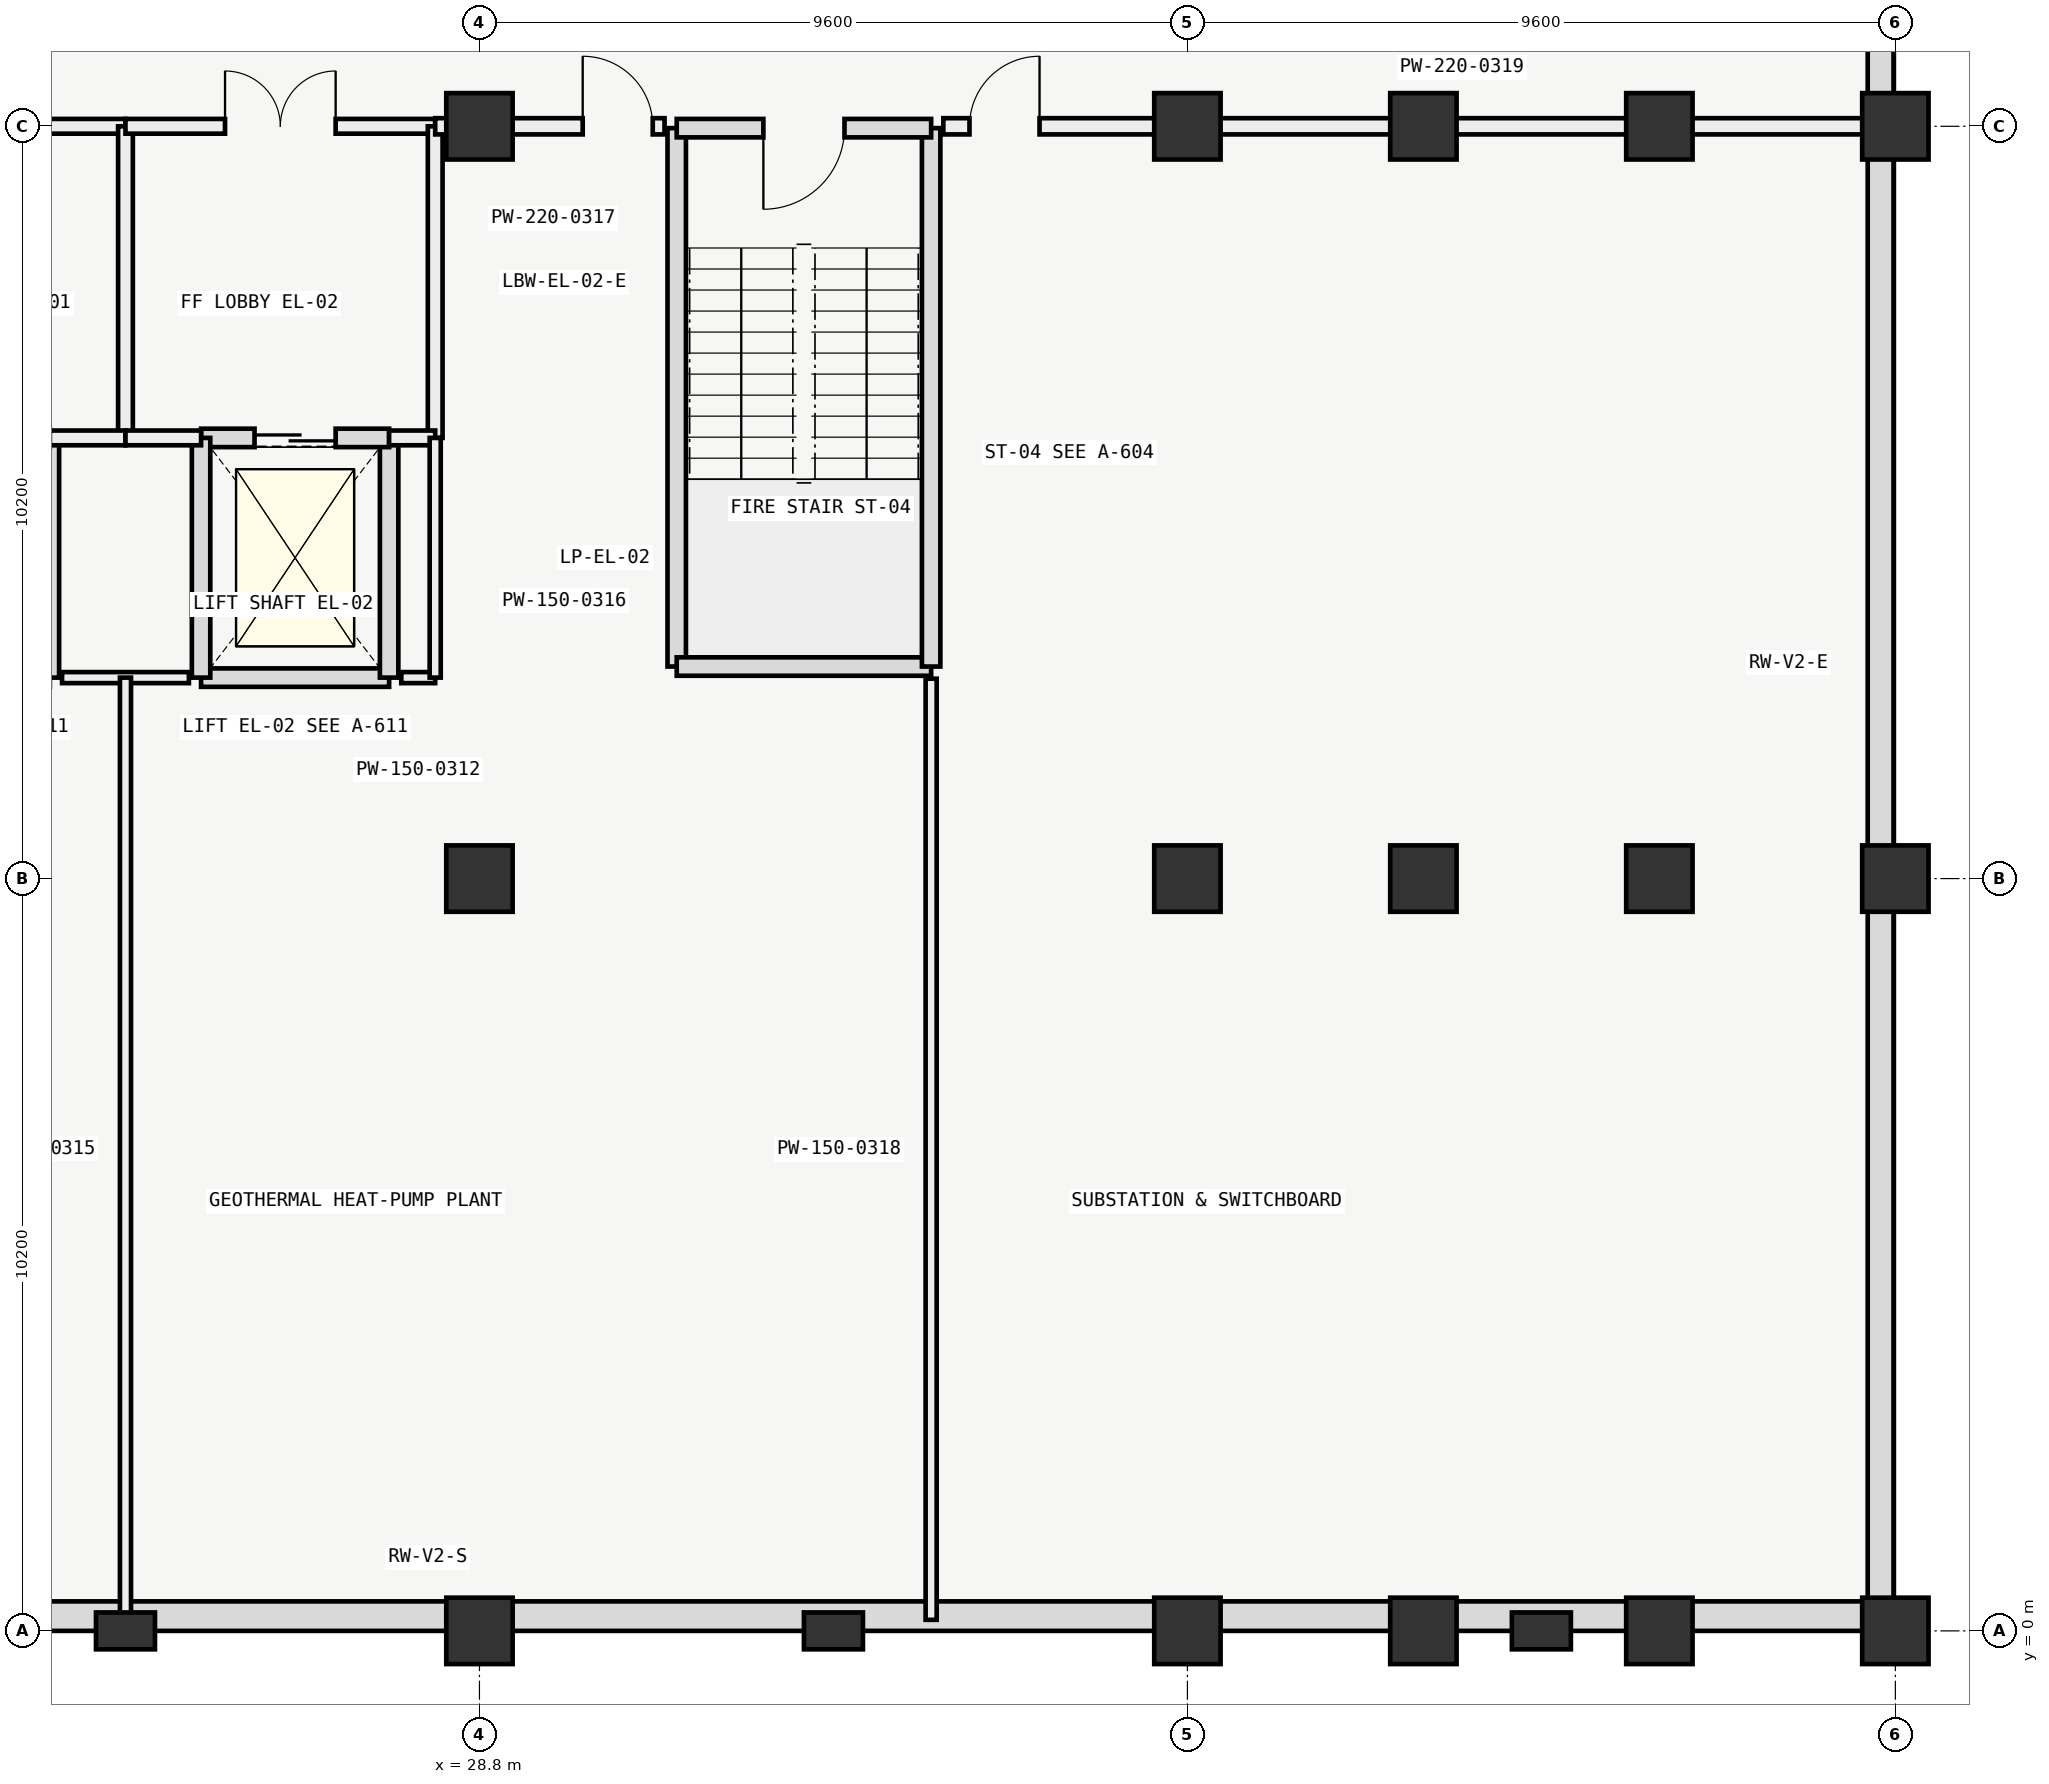
"""IFC4 building model, lengths in metres.
Left out: names, types, materials, properties, quantities, classifications, styles, units other than length and angle.
Written with IfcOpenShell. Run it as: python <this file> out.ifc"""

import sys

from ifc_helpers import new_model, si_unit, direction, frame, frame_2d, origin, origin_2d, place, context, subcontext, project, spatial, rectangle, extrude, element, fill, save


model = new_model("IFC4")
c1 = context("Model", 3, precision=1e-05, world=origin(), true_north=direction((0.0, 1.0)))
c2 = subcontext(c1, "Body", "Model", "MODEL_VIEW")
j1 = project(units=[si_unit("LENGTHUNIT", "METRE"), si_unit("PLANEANGLEUNIT", "RADIAN")], contexts=[c1])
p1 = place(None, origin())
s1 = spatial("IfcSite", under=j1, at=p1, CompositionType="ELEMENT")
p2 = place(p1, origin())
s2 = spatial("IfcBuilding", under=s1, at=p2, CompositionType="ELEMENT")
p3 = place(p2, frame((0.0, 0.0, -4.2)))
s3 = spatial("IfcBuildingStorey", under=s2, at=p3, CompositionType="ELEMENT", Elevation=-4.2)
for number, where, z_axis, x_axis in (
    (1, (28.8, 0.0, 0.0), (0.0, 0.0, 1.0), (1.0, 0.0, 0.0)),
    (2, (28.8, 10.2, 0.0), (0.0, 0.0, 1.0), (1.0, 0.0, 0.0)),
    (3, (28.8, 20.4, 0.0), (0.0, 0.0, 1.0), (1.0, 0.0, 0.0)),
    (4, (38.4, 0.0, 0.0), (0.0, 0.0, 1.0), (1.0, 0.0, 0.0)),
    (5, (38.4, 10.2, 0.0), (0.0, 0.0, 1.0), (1.0, 0.0, 0.0)),
    (6, (38.4, 20.4, 0.0), (0.0, 0.0, 1.0), (1.0, 0.0, 0.0)),
    (7, (41.6, 0.0, 0.0), (0.0, 0.0, 1.0), (1.0, 0.0, 0.0)),
    (8, (41.6, 10.2, 0.0), (0.0, 0.0, 1.0), (1.0, 0.0, 0.0)),
    (9, (41.6, 20.4, 0.0), (0.0, 0.0, 1.0), (1.0, 0.0, 0.0)),
    (10, (44.8, 0.0, 0.0), (0.0, 0.0, 1.0), (1.0, 0.0, 0.0)),
    (11, (44.8, 10.2, 0.0), (0.0, 0.0, 1.0), (1.0, 0.0, 0.0)),
    (12, (44.8, 20.4, 0.0), (0.0, 0.0, 1.0), (1.0, 0.0, 0.0)),
    (13, (48.0, 0.0, 0.0), (0.0, 0.0, 1.0), (1.0, 0.0, 0.0)),
    (14, (48.0, 10.2, 0.0), (0.0, 0.0, 1.0), (1.0, 0.0, 0.0)),
    (15, (48.0, 20.4, 0.0), (0.0, 0.0, 1.0), (1.0, 0.0, 0.0)),
):
    element("IfcColumn", number, at=place(p3, frame(where, z_axis=z_axis, x_axis=x_axis)), inside=s3, PredefinedType="COLUMN", context=c2, shape_type="SweptSolid", body=[
        extrude(rectangle(XDim=0.9, YDim=0.9, at=origin_2d()), origin(), (0.0, 0.0, 1.0), 4.2),
    ])
for number, where, z_axis, x_axis in (
    (16, (24.0, 0.0, 0.0), (0.0, 0.0, 1.0), (0.0, 1.0, 0.0)),
    (17, (33.6, 0.0, 0.0), (0.0, 0.0, 1.0), (0.0, 1.0, 0.0)),
    (18, (43.2, 0.0, 0.0), (0.0, 0.0, 1.0), (0.0, 1.0, 0.0)),
):
    element("IfcColumn", number, at=place(p3, frame(where, z_axis=z_axis, x_axis=x_axis)), inside=s3, PredefinedType="PILASTER", context=c2, shape_type="SweptSolid", body=[
        extrude(rectangle(XDim=0.5, YDim=0.8, at=origin_2d()), origin(), (0.0, 0.0, 1.0), 4.2),
    ])
p4 = place(p3, frame((8.4, 0.2, 0.0), z_axis=(0.0, 0.0, 1.0), x_axis=(1.0, 0.0, 0.0)))
e19 = element("IfcWall", 19, at=p4, inside=s3, PredefinedType="USERDEFINED", context=c2, shape_type="SweptSolid", body=[
    extrude(rectangle(XDim=39.4, YDim=0.4, at=frame_2d((19.7, 0.0))), origin(), (0.0, 0.0, 1.0), 3.9),
])
p5 = place(p3, frame((47.8, 0.2, 0.0), z_axis=(0.0, 0.0, 1.0), x_axis=(0.0, 1.0, 0.0)))
e20 = element("IfcWall", 20, at=p5, inside=s3, PredefinedType="USERDEFINED", context=c2, shape_type="SweptSolid", body=[
    extrude(rectangle(XDim=40.4, YDim=0.35, at=frame_2d((20.2, 0.0))), origin(), (0.0, 0.0, 1.0), 3.9),
])
p6 = place(p3, frame((31.475, 20.375, 0.0), z_axis=(0.0, 0.0, 1.0), x_axis=(0.0, -1.0, 0.0)))
e21 = element("IfcWall", 21, at=p6, inside=s3, PredefinedType="SOLIDWALL", context=c2, shape_type="SweptSolid", body=[
    extrude(rectangle(XDim=7.3, YDim=0.25, at=frame_2d((3.65, 0.0))), origin(), (0.0, 0.0, 1.0), 3.9),
])
p7 = place(p3, frame((31.475, 13.075, 0.0), z_axis=(0.0, 0.0, 1.0), x_axis=(1.0, 0.0, 0.0)))
e22 = element("IfcWall", 22, at=p7, inside=s3, PredefinedType="SOLIDWALL", context=c2, shape_type="SweptSolid", body=[
    extrude(rectangle(XDim=3.45, YDim=0.25, at=frame_2d((1.725, 0.0))), origin(), (0.0, 0.0, 1.0), 3.9),
])
p8 = place(p3, frame((34.925, 13.075, 0.0), z_axis=(0.0, 0.0, 1.0), x_axis=(0.0, 1.0, 0.0)))
e23 = element("IfcWall", 23, at=p8, inside=s3, PredefinedType="SOLIDWALL", context=c2, shape_type="SweptSolid", body=[
    extrude(rectangle(XDim=7.3, YDim=0.25, at=frame_2d((3.65, 0.0))), origin(), (0.0, 0.0, 1.0), 3.9),
])
p9 = place(p3, frame((34.925, 20.375, 0.0), z_axis=(0.0, 0.0, 1.0), x_axis=(-1.0, 0.0, 0.0)))
e24 = element("IfcWall", 24, at=p9, inside=s3, PredefinedType="SOLIDWALL", context=c2, shape_type="SweptSolid", body=[
    extrude(rectangle(XDim=3.45, YDim=0.25, at=frame_2d((1.725, 0.0))), origin(), (0.0, 0.0, 1.0), 3.9),
])
p10 = place(p9, frame((1.175, 0.0, 0.0)))
e25 = element("IfcOpeningElement", 25, at=p10, cuts=e24, PredefinedType="OPENING", context=c2, shape_type="SweptSolid", body=[
    extrude(rectangle(XDim=1.1, YDim=2.2, at=frame_2d((0.55, 1.1))), frame((0.0, 0.135, 0.0), z_axis=(0.0, -1.0, 0.0), x_axis=(1.0, 0.0, 0.0)), (0.0, 0.0, 1.0), 0.27),
])
p11 = place(p3, frame((22.975, 12.925, -0.15), z_axis=(0.0, 0.0, 1.0), x_axis=(0.0, 1.0, 0.0)))
e26 = element("IfcWall", 26, at=p11, inside=s3, PredefinedType="SOLIDWALL", context=c2, shape_type="SweptSolid", body=[
    extrude(rectangle(XDim=3.25, YDim=0.25, at=frame_2d((1.625, 0.0))), origin(), (0.0, 0.0, 1.0), 4.05),
])
p12 = place(p3, frame((19.8, 20.4, 0.0), z_axis=(0.0, 0.0, 1.0), x_axis=(1.0, 0.0, 0.0)))
e27 = element("IfcWall", 27, at=p12, inside=s3, PredefinedType="PARTITIONING", context=c2, shape_type="SweptSolid", body=[
    extrude(rectangle(XDim=4.2, YDim=0.2, at=frame_2d((2.1, 0.0))), origin(), (0.0, 0.0, 1.0), 3.18),
])
p13 = place(p12, frame((1.35, 0.0, 0.0)))
e28 = element("IfcOpeningElement", 28, at=p13, cuts=e27, PredefinedType="OPENING", context=c2, shape_type="SweptSolid", body=[
    extrude(rectangle(XDim=1.5, YDim=2.2, at=frame_2d((0.75, 1.1))), frame((0.0, 0.11, 0.0), z_axis=(0.0, -1.0, 0.0), x_axis=(1.0, 0.0, 0.0)), (0.0, 0.0, 1.0), 0.22),
])
p14 = place(p3, frame((24.0, 16.175, 0.0), z_axis=(0.0, 0.0, 1.0), x_axis=(0.0, 1.0, 0.0)))
e29 = element("IfcWall", 29, at=p14, inside=s3, PredefinedType="PARTITIONING", context=c2, shape_type="SweptSolid", body=[
    extrude(rectangle(XDim=4.225, YDim=0.2, at=frame_2d((2.112, 0.0))), origin(), (0.0, 0.0, 1.0), 3.18),
])
p15 = place(p3, frame((22.975, 16.175, 0.0), z_axis=(0.0, 0.0, 1.0), x_axis=(1.0, 0.0, 0.0)))
e30 = element("IfcWall", 30, at=p15, inside=s3, PredefinedType="PARTITIONING", context=c2, shape_type="SweptSolid", body=[
    extrude(rectangle(XDim=1.025, YDim=0.2, at=frame_2d((0.512, 0.0))), origin(), (0.0, 0.0, 1.0), 3.55),
])
p16 = place(p3, frame((25.025, 12.925, -0.15), z_axis=(0.0, 0.0, 1.0), x_axis=(1.0, 0.0, 0.0)))
e31 = element("IfcWall", 31, at=p16, inside=s3, PredefinedType="SOLIDWALL", context=c2, shape_type="SweptSolid", body=[
    extrude(rectangle(XDim=2.55, YDim=0.25, at=frame_2d((1.275, 0.0))), origin(), (0.0, 0.0, 1.0), 4.05),
])
p17 = place(p3, frame((27.575, 12.925, -0.15), z_axis=(0.0, 0.0, 1.0), x_axis=(0.0, 1.0, 0.0)))
e32 = element("IfcWall", 32, at=p17, inside=s3, PredefinedType="SOLIDWALL", context=c2, shape_type="SweptSolid", body=[
    extrude(rectangle(XDim=3.25, YDim=0.25, at=frame_2d((1.625, 0.0))), origin(), (0.0, 0.0, 1.0), 4.05),
])
p18 = place(p3, frame((27.575, 16.175, -0.15), z_axis=(0.0, 0.0, 1.0), x_axis=(-1.0, 0.0, 0.0)))
e33 = element("IfcWall", 33, at=p18, inside=s3, PredefinedType="SOLIDWALL", context=c2, shape_type="SweptSolid", body=[
    extrude(rectangle(XDim=2.55, YDim=0.25, at=frame_2d((1.275, 0.0))), origin(), (0.0, 0.0, 1.0), 4.05),
])
p19 = place(p18, frame((0.725, 0.0, 0.15)))
e34 = element("IfcOpeningElement", 34, at=p19, cuts=e33, PredefinedType="OPENING", context=c2, shape_type="SweptSolid", body=[
    extrude(rectangle(XDim=1.1, YDim=2.1, at=frame_2d((0.55, 1.05))), frame((0.0, 0.135, 0.0), z_axis=(0.0, -1.0, 0.0), x_axis=(1.0, 0.0, 0.0)), (0.0, 0.0, 1.0), 0.27),
])
p20 = place(p3, frame((25.025, 16.175, -0.15), z_axis=(0.0, 0.0, 1.0), x_axis=(0.0, -1.0, 0.0)))
e35 = element("IfcWall", 35, at=p20, inside=s3, PredefinedType="SOLIDWALL", context=c2, shape_type="SweptSolid", body=[
    extrude(rectangle(XDim=3.25, YDim=0.25, at=frame_2d((1.625, 0.0))), origin(), (0.0, 0.0, 1.0), 4.05),
])
p21 = place(p3, frame((24.0, 20.4, 0.0), z_axis=(0.0, 0.0, 1.0), x_axis=(1.0, 0.0, 0.0)))
e36 = element("IfcWall", 36, at=p21, inside=s3, PredefinedType="PARTITIONING", context=c2, shape_type="SweptSolid", body=[
    extrude(rectangle(XDim=4.2, YDim=0.2, at=frame_2d((2.1, 0.0))), origin(), (0.0, 0.0, 1.0), 3.18),
])
p22 = place(p21, frame((1.35, 0.0, 0.0)))
e37 = element("IfcOpeningElement", 37, at=p22, cuts=e36, PredefinedType="OPENING", context=c2, shape_type="SweptSolid", body=[
    extrude(rectangle(XDim=1.5, YDim=2.2, at=frame_2d((0.75, 1.1))), frame((0.0, 0.11, 0.0), z_axis=(0.0, -1.0, 0.0), x_axis=(1.0, 0.0, 0.0)), (0.0, 0.0, 1.0), 0.22),
])
p23 = place(p3, frame((28.2, 16.175, 0.0), z_axis=(0.0, 0.0, 1.0), x_axis=(0.0, 1.0, 0.0)))
e38 = element("IfcWall", 38, at=p23, inside=s3, PredefinedType="PARTITIONING", context=c2, shape_type="SweptSolid", body=[
    extrude(rectangle(XDim=4.225, YDim=0.2, at=frame_2d((2.112, 0.0))), origin(), (0.0, 0.0, 1.0), 3.18),
])
p24 = place(p3, frame((24.0, 16.175, 0.0), z_axis=(0.0, 0.0, 1.0), x_axis=(1.0, 0.0, 0.0)))
e39 = element("IfcWall", 39, at=p24, inside=s3, PredefinedType="PARTITIONING", context=c2, shape_type="SweptSolid", body=[
    extrude(rectangle(XDim=1.025, YDim=0.2, at=frame_2d((0.512, 0.0))), origin(), (0.0, 0.0, 1.0), 3.55),
])
p25 = place(p3, frame((27.575, 16.175, 0.0), z_axis=(0.0, 0.0, 1.0), x_axis=(1.0, 0.0, 0.0)))
e40 = element("IfcWall", 40, at=p25, inside=s3, PredefinedType="PARTITIONING", context=c2, shape_type="SweptSolid", body=[
    extrude(rectangle(XDim=0.625, YDim=0.2, at=frame_2d((0.312, 0.0))), origin(), (0.0, 0.0, 1.0), 3.55),
])
p26 = place(p3, frame((23.14, 12.925, 0.0), z_axis=(0.0, 0.0, 1.0), x_axis=(1.0, 0.0, 0.0)))
e41 = element("IfcWall", 41, at=p26, inside=s3, PredefinedType="PARTITIONING", context=c2, shape_type="SweptSolid", body=[
    extrude(rectangle(XDim=1.72, YDim=0.15, at=frame_2d((0.86, 0.0))), origin(), (0.0, 0.0, 1.0), 3.85),
])
p27 = place(p3, frame((27.74, 12.925, 0.0), z_axis=(0.0, 0.0, 1.0), x_axis=(1.0, 0.0, 0.0)))
e42 = element("IfcWall", 42, at=p27, inside=s3, PredefinedType="PARTITIONING", context=c2, shape_type="SweptSolid", body=[
    extrude(rectangle(XDim=0.46, YDim=0.15, at=frame_2d((0.23, 0.0))), origin(), (0.0, 0.0, 1.0), 3.85),
])
p28 = place(p3, frame((24.0, 0.15, 0.0), z_axis=(0.0, 0.0, 1.0), x_axis=(0.0, 1.0, 0.0)))
e43 = element("IfcWall", 43, at=p28, inside=s3, PredefinedType="PARTITIONING", context=c2, shape_type="SweptSolid", body=[
    extrude(rectangle(XDim=12.775, YDim=0.15, at=frame_2d((6.388, 0.0))), origin(), (0.0, 0.0, 1.0), 3.18),
])
p29 = place(p3, frame((28.2, 12.925, 0.0), z_axis=(0.0, 0.0, 1.0), x_axis=(0.0, 1.0, 0.0)))
e44 = element("IfcWall", 44, at=p29, inside=s3, PredefinedType="PARTITIONING", context=c2, shape_type="SweptSolid", body=[
    extrude(rectangle(XDim=3.25, YDim=0.15, at=frame_2d((1.625, 0.0))), origin(), (0.0, 0.0, 1.0), 3.85),
])
p30 = place(p3, frame((28.2, 20.4, 0.0), z_axis=(0.0, 0.0, 1.0), x_axis=(1.0, 0.0, 0.0)))
e45 = element("IfcWall", 45, at=p30, inside=s3, PredefinedType="PARTITIONING", context=c2, shape_type="SweptSolid", body=[
    extrude(rectangle(XDim=3.11, YDim=0.22, at=frame_2d((1.555, 0.0))), origin(), (0.0, 0.0, 1.0), 3.18),
])
p31 = place(p30, frame((2.0, 0.0, 0.0)))
e46 = element("IfcOpeningElement", 46, at=p31, cuts=e45, PredefinedType="OPENING", context=c2, shape_type="SweptSolid", body=[
    extrude(rectangle(XDim=0.95, YDim=2.1, at=frame_2d((0.475, 1.05))), frame((0.0, 0.12, 0.0), z_axis=(0.0, -1.0, 0.0), x_axis=(1.0, 0.0, 0.0)), (0.0, 0.0, 1.0), 0.24),
])
p32 = place(p3, frame((34.925, 0.15, 0.0), z_axis=(0.0, 0.0, 1.0), x_axis=(0.0, 1.0, 0.0)))
e47 = element("IfcWall", 47, at=p32, inside=s3, PredefinedType="PARTITIONING", context=c2, shape_type="SweptSolid", body=[
    extrude(rectangle(XDim=12.76, YDim=0.15, at=frame_2d((6.38, 0.0))), origin(), (0.0, 0.0, 1.0), 3.18),
])
p33 = place(p3, frame((35.09, 20.4, 0.0), z_axis=(0.0, 0.0, 1.0), x_axis=(1.0, 0.0, 0.0)))
e48 = element("IfcWall", 48, at=p33, inside=s3, PredefinedType="PARTITIONING", context=c2, shape_type="SweptSolid", body=[
    extrude(rectangle(XDim=12.76, YDim=0.22, at=frame_2d((6.38, 0.0))), origin(), (0.0, 0.0, 1.0), 3.18),
])
p34 = place(p33, frame((0.355, 0.0, 0.0)))
e49 = element("IfcOpeningElement", 49, at=p34, cuts=e48, PredefinedType="OPENING", context=c2, shape_type="SweptSolid", body=[
    extrude(rectangle(XDim=0.95, YDim=2.1, at=frame_2d((0.475, 1.05))), frame((0.0, 0.12, 0.0), z_axis=(0.0, -1.0, 0.0), x_axis=(1.0, 0.0, 0.0)), (0.0, 0.0, 1.0), 0.24),
])
p35 = place(p10, origin())
e50 = element("IfcDoor", 50, at=p35, inside=s3, OperationType="SINGLE_SWING_RIGHT", PredefinedType="DOOR", context=c2, shape_type="SweptSolid", body=[
    extrude(rectangle(XDim=1.1, YDim=2.2, at=frame_2d((0.55, 1.1))), frame((0.0, 0.025, 0.0), z_axis=(0.0, -1.0, 0.0), x_axis=(1.0, 0.0, 0.0)), (0.0, 0.0, 1.0), 0.05),
])
fill(e25, e50)
p36 = place(p19, origin())
e51 = element("IfcDoor", 51, at=p36, inside=s3, OperationType="SLIDING_TO_LEFT", PredefinedType="DOOR", context=c2, shape_type="SweptSolid", body=[
    extrude(rectangle(XDim=1.1, YDim=2.1, at=frame_2d((0.55, 1.05))), frame((0.0, 0.025, 0.0), z_axis=(0.0, -1.0, 0.0), x_axis=(1.0, 0.0, 0.0)), (0.0, 0.0, 1.0), 0.05),
])
fill(e34, e51)
p37 = place(p22, origin())
e52 = element("IfcDoor", 52, at=p37, inside=s3, OperationType="SINGLE_SWING_LEFT", PredefinedType="DOOR", context=c2, shape_type="SweptSolid", body=[
    extrude(rectangle(XDim=1.5, YDim=2.2, at=frame_2d((0.75, 1.1))), frame((0.0, 0.025, 0.0), z_axis=(0.0, -1.0, 0.0), x_axis=(1.0, 0.0, 0.0)), (0.0, 0.0, 1.0), 0.05),
])
fill(e37, e52)
p38 = place(p31, origin())
e53 = element("IfcDoor", 53, at=p38, inside=s3, OperationType="SINGLE_SWING_LEFT", PredefinedType="DOOR", context=c2, shape_type="SweptSolid", body=[
    extrude(rectangle(XDim=0.95, YDim=2.1, at=frame_2d((0.475, 1.05))), frame((0.0, 0.025, 0.0), z_axis=(0.0, -1.0, 0.0), x_axis=(1.0, 0.0, 0.0)), (0.0, 0.0, 1.0), 0.05),
])
fill(e46, e53)
p39 = place(p34, origin())
e54 = element("IfcDoor", 54, at=p39, inside=s3, OperationType="SINGLE_SWING_RIGHT", PredefinedType="DOOR", context=c2, shape_type="SweptSolid", body=[
    extrude(rectangle(XDim=0.95, YDim=2.1, at=frame_2d((0.475, 1.05))), frame((0.0, 0.025, 0.0), z_axis=(0.0, -1.0, 0.0), x_axis=(1.0, 0.0, 0.0)), (0.0, 0.0, 1.0), 0.05),
])
fill(e49, e54)
save(model, sys.argv[1])
